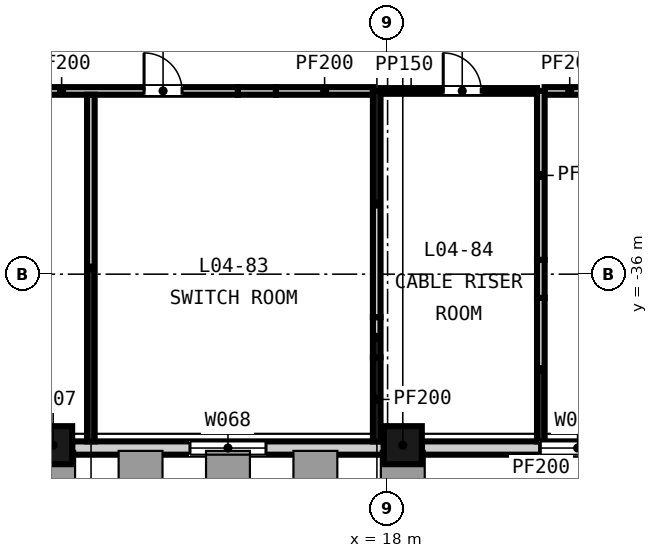
"""IFC4 building model, lengths in metres.
Left out: names, types, materials, properties, quantities, classifications, styles, units other than length and angle.
Written with IfcOpenShell. Run it as: python <this file> out.ifc"""

import sys

from ifc_helpers import new_model, si_unit, direction, frame, frame_2d, origin, origin_2d, place, context, subcontext, project, spatial, rectangle, extrude, element, fill, save


model = new_model("IFC4")
c1 = context("Model", 3, precision=1e-05, world=origin(), true_north=direction((0.0, 1.0)))
c2 = subcontext(c1, "Body", "Model", "MODEL_VIEW")
j1 = project(units=[si_unit("LENGTHUNIT", "METRE"), si_unit("PLANEANGLEUNIT", "RADIAN")], contexts=[c1])
p1 = place(None, origin())
s1 = spatial("IfcSite", under=j1, at=p1, CompositionType="ELEMENT")
p2 = place(p1, origin())
s2 = spatial("IfcBuilding", under=s1, at=p2, CompositionType="ELEMENT")
p3 = place(p2, frame((0.0, 0.0, 27.0)))
s3 = spatial("IfcBuildingStorey", under=s2, at=p3, CompositionType="ELEMENT", Elevation=27.0)
for number, where, z_axis, x_axis in (
    (1, (9.2, -40.5, -0.3), (0.0, 0.0, 1.0), (1.0, 0.0, 0.0)),
    (2, (18.4, -40.5, -0.3), (0.0, 0.0, 1.0), (1.0, 0.0, 0.0)),
):
    element("IfcColumn", number, at=place(p3, frame(where, z_axis=z_axis, x_axis=x_axis)), inside=s3, PredefinedType="COLUMN", context=c2, shape_type="SweptSolid", body=[
        extrude(rectangle(XDim=1.0, YDim=1.0, at=origin_2d()), origin(), (0.0, 0.0, 1.0), 4.5),
    ])
p4 = place(p3, frame((9.7, -40.575, -0.3), z_axis=(0.0, 0.0, 1.0), x_axis=(1.0, 0.0, 0.0)))
e3 = element("IfcWall", 3, at=p4, inside=s3, PredefinedType="SOLIDWALL", context=c2, shape_type="SweptSolid", body=[
    extrude(rectangle(XDim=8.2, YDim=0.35, at=frame_2d((4.1, 0.0))), origin(), (0.0, 0.0, 1.0), 3.6),
])
p5 = place(p4, frame((3.1, 0.0, 1.2)))
e4 = element("IfcOpeningElement", 4, at=p5, cuts=e3, PredefinedType="OPENING", context=c2, shape_type="SweptSolid", body=[
    extrude(rectangle(XDim=2.0, YDim=2.35, at=frame_2d((1.0, 1.175))), frame((0.0, 0.185, 0.0), z_axis=(0.0, -1.0, 0.0), x_axis=(1.0, 0.0, 0.0)), (0.0, 0.0, 1.0), 0.37),
])
p6 = place(p3, frame((18.9, -40.575, -0.3), z_axis=(0.0, 0.0, 1.0), x_axis=(1.0, 0.0, 0.0)))
e5 = element("IfcWall", 5, at=p6, inside=s3, PredefinedType="SOLIDWALL", context=c2, shape_type="SweptSolid", body=[
    extrude(rectangle(XDim=8.2, YDim=0.35, at=frame_2d((4.1, 0.0))), origin(), (0.0, 0.0, 1.0), 3.6),
])
p7 = place(p6, frame((3.1, 0.0, 1.2)))
e6 = element("IfcOpeningElement", 6, at=p7, cuts=e5, PredefinedType="OPENING", context=c2, shape_type="SweptSolid", body=[
    extrude(rectangle(XDim=2.0, YDim=2.35, at=frame_2d((1.0, 1.175))), frame((0.0, 0.185, 0.0), z_axis=(0.0, -1.0, 0.0), x_axis=(1.0, 0.0, 0.0)), (0.0, 0.0, 1.0), 0.37),
])
p8 = place(p3, frame((4.344, -31.179, 0.0), z_axis=(0.0, 0.0, 1.0), x_axis=(1.0, 0.0, 0.0)))
e7 = element("IfcWall", 7, at=p8, inside=s3, PredefinedType="PARTITIONING", context=c2, shape_type="SweptSolid", body=[
    extrude(rectangle(XDim=9.718, YDim=0.2, at=frame_2d((4.859, 0.0))), origin(), (0.0, 0.0, 1.0), 4.2),
])
p9 = place(p8, frame((1.9, 0.0, 0.0)))
e8 = element("IfcOpeningElement", 8, at=p9, cuts=e7, PredefinedType="OPENING", context=c2, shape_type="SweptSolid", body=[
    extrude(rectangle(XDim=1.0, YDim=2.1, at=frame_2d((0.5, 1.05))), frame((0.0, 0.11, 0.0), z_axis=(0.0, -1.0, 0.0), x_axis=(1.0, 0.0, 0.0)), (0.0, 0.0, 1.0), 0.22),
])
p10 = place(p8, frame((7.249, 0.0, 0.0)))
e9 = element("IfcOpeningElement", 9, at=p10, cuts=e7, PredefinedType="OPENING", context=c2, shape_type="SweptSolid", body=[
    extrude(rectangle(XDim=1.0, YDim=2.1, at=frame_2d((0.5, 1.05))), frame((0.0, 0.11, 0.0), z_axis=(0.0, -1.0, 0.0), x_axis=(1.0, 0.0, 0.0)), (0.0, 0.0, 1.0), 0.22),
])
p11 = place(p3, frame((14.062, -31.179, 0.0), z_axis=(0.0, 0.0, 1.0), x_axis=(1.0, 0.0, 0.0)))
e10 = element("IfcWall", 10, at=p11, inside=s3, PredefinedType="PARTITIONING", context=c2, shape_type="SweptSolid", body=[
    extrude(rectangle(XDim=1.0, YDim=0.2, at=frame_2d((0.5, 0.0))), origin(), (0.0, 0.0, 1.0), 3.451),
])
p12 = place(p3, frame((15.062, -31.179, 0.0), z_axis=(0.0, 0.0, 1.0), x_axis=(1.0, 0.0, 0.0)))
e11 = element("IfcWall", 11, at=p12, inside=s3, PredefinedType="PARTITIONING", context=c2, shape_type="SweptSolid", body=[
    extrude(rectangle(XDim=2.552, YDim=0.2, at=frame_2d((1.276, 0.0))), origin(), (0.0, 0.0, 1.0), 4.2),
])
p13 = place(p3, frame((17.814, -31.179, 0.0), z_axis=(0.0, 0.0, 1.0), x_axis=(1.0, 0.0, 0.0)))
e12 = element("IfcWall", 12, at=p13, inside=s3, PredefinedType="PARTITIONING", context=c2, shape_type="SweptSolid", body=[
    extrude(rectangle(XDim=4.118, YDim=0.15, at=frame_2d((2.059, 0.0))), origin(), (0.0, 0.0, 1.0), 4.2),
])
p14 = place(p13, frame((1.65, 0.0, 0.0)))
e13 = element("IfcOpeningElement", 13, at=p14, cuts=e12, PredefinedType="OPENING", context=c2, shape_type="SweptSolid", body=[
    extrude(rectangle(XDim=1.0, YDim=2.1, at=frame_2d((0.5, 1.05))), frame((0.0, 0.085, 0.0), z_axis=(0.0, -1.0, 0.0), x_axis=(1.0, 0.0, 0.0)), (0.0, 0.0, 1.0), 0.17),
])
p15 = place(p3, frame((22.132, -31.179, 0.0), z_axis=(0.0, 0.0, 1.0), x_axis=(1.0, 0.0, 0.0)))
e14 = element("IfcWall", 14, at=p15, inside=s3, PredefinedType="PARTITIONING", context=c2, shape_type="SweptSolid", body=[
    extrude(rectangle(XDim=1.31, YDim=0.2, at=frame_2d((0.655, 0.0))), origin(), (0.0, 0.0, 1.0), 4.2),
])
p16 = place(p3, frame((10.192, -40.4, 0.0), z_axis=(0.0, 0.0, 1.0), x_axis=(0.0, 1.0, 0.0)))
e15 = element("IfcWall", 15, at=p16, inside=s3, PredefinedType="PARTITIONING", context=c2, shape_type="SweptSolid", body=[
    extrude(rectangle(XDim=9.121, YDim=0.2, at=frame_2d((4.561, 0.0))), origin(), (0.0, 0.0, 1.0), 4.2),
])
p17 = place(p3, frame((17.714, -40.4, 0.0), z_axis=(0.0, 0.0, 1.0), x_axis=(0.0, 1.0, 0.0)))
e16 = element("IfcWall", 16, at=p17, inside=s3, PredefinedType="PARTITIONING", context=c2, shape_type="SweptSolid", body=[
    extrude(rectangle(XDim=2.208, YDim=0.2, at=frame_2d((1.104, 0.0))), origin(), (0.0, 0.0, 1.0), 4.2),
])
p18 = place(p3, frame((17.714, -38.191, 0.0), z_axis=(0.0, 0.0, 1.0), x_axis=(0.0, 1.0, 0.0)))
e17 = element("IfcWall", 17, at=p18, inside=s3, PredefinedType="PARTITIONING", context=c2, shape_type="SweptSolid", body=[
    extrude(rectangle(XDim=1.06, YDim=0.2, at=frame_2d((0.53, 0.0))), origin(), (0.0, 0.0, 1.0), 3.451),
])
p19 = place(p3, frame((17.714, -37.132, 0.0), z_axis=(0.0, 0.0, 1.0), x_axis=(0.0, 1.0, 0.0)))
e18 = element("IfcWall", 18, at=p19, inside=s3, PredefinedType="PARTITIONING", context=c2, shape_type="SweptSolid", body=[
    extrude(rectangle(XDim=5.953, YDim=0.2, at=frame_2d((2.976, 0.0))), origin(), (0.0, 0.0, 1.0), 4.2),
])
p20 = place(p3, frame((22.032, -40.4, 0.0), z_axis=(0.0, 0.0, 1.0), x_axis=(0.0, 1.0, 0.0)))
e19 = element("IfcWall", 19, at=p20, inside=s3, PredefinedType="PARTITIONING", context=c2, shape_type="SweptSolid", body=[
    extrude(rectangle(XDim=3.776, YDim=0.2, at=frame_2d((1.888, 0.0))), origin(), (0.0, 0.0, 1.0), 4.2),
])
p21 = place(p3, frame((22.032, -36.624, 0.0), z_axis=(0.0, 0.0, 1.0), x_axis=(0.0, 1.0, 0.0)))
e20 = element("IfcWall", 20, at=p21, inside=s3, PredefinedType="PARTITIONING", context=c2, shape_type="SweptSolid", body=[
    extrude(rectangle(XDim=1.0, YDim=0.2, at=frame_2d((0.5, 0.0))), origin(), (0.0, 0.0, 1.0), 3.451),
])
p22 = place(p3, frame((22.032, -35.624, 0.0), z_axis=(0.0, 0.0, 1.0), x_axis=(0.0, 1.0, 0.0)))
e21 = element("IfcWall", 21, at=p22, inside=s3, PredefinedType="PARTITIONING", context=c2, shape_type="SweptSolid", body=[
    extrude(rectangle(XDim=4.445, YDim=0.2, at=frame_2d((2.222, 0.0))), origin(), (0.0, 0.0, 1.0), 4.2),
])
p23 = place(p5, origin())
e22 = element("IfcWindow", 22, at=p23, inside=s3, PartitioningType="SINGLE_PANEL", PredefinedType="WINDOW", context=c2, shape_type="SweptSolid", body=[
    extrude(rectangle(XDim=2.0, YDim=2.35, at=frame_2d((1.0, 1.175))), frame((0.0, 0.03, 0.0), z_axis=(0.0, -1.0, 0.0), x_axis=(1.0, 0.0, 0.0)), (0.0, 0.0, 1.0), 0.06),
])
fill(e4, e22)
p24 = place(p7, origin())
e23 = element("IfcWindow", 23, at=p24, inside=s3, PartitioningType="SINGLE_PANEL", PredefinedType="WINDOW", context=c2, shape_type="SweptSolid", body=[
    extrude(rectangle(XDim=2.0, YDim=2.35, at=frame_2d((1.0, 1.175))), frame((0.0, 0.03, 0.0), z_axis=(0.0, -1.0, 0.0), x_axis=(1.0, 0.0, 0.0)), (0.0, 0.0, 1.0), 0.06),
])
fill(e6, e23)
p25 = place(p10, origin())
e24 = element("IfcDoor", 24, at=p25, inside=s3, OperationType="SINGLE_SWING_LEFT", PredefinedType="DOOR", context=c2, shape_type="SweptSolid", body=[
    extrude(rectangle(XDim=1.0, YDim=2.1, at=frame_2d((0.5, 1.05))), frame((0.0, 0.025, 0.0), z_axis=(0.0, -1.0, 0.0), x_axis=(1.0, 0.0, 0.0)), (0.0, 0.0, 1.0), 0.05),
])
fill(e9, e24)
p26 = place(p14, origin())
e25 = element("IfcDoor", 25, at=p26, inside=s3, OperationType="SINGLE_SWING_LEFT", PredefinedType="DOOR", context=c2, shape_type="SweptSolid", body=[
    extrude(rectangle(XDim=1.0, YDim=2.1, at=frame_2d((0.5, 1.05))), frame((0.0, 0.025, 0.0), z_axis=(0.0, -1.0, 0.0), x_axis=(1.0, 0.0, 0.0)), (0.0, 0.0, 1.0), 0.05),
])
fill(e13, e25)
save(model, sys.argv[1])
